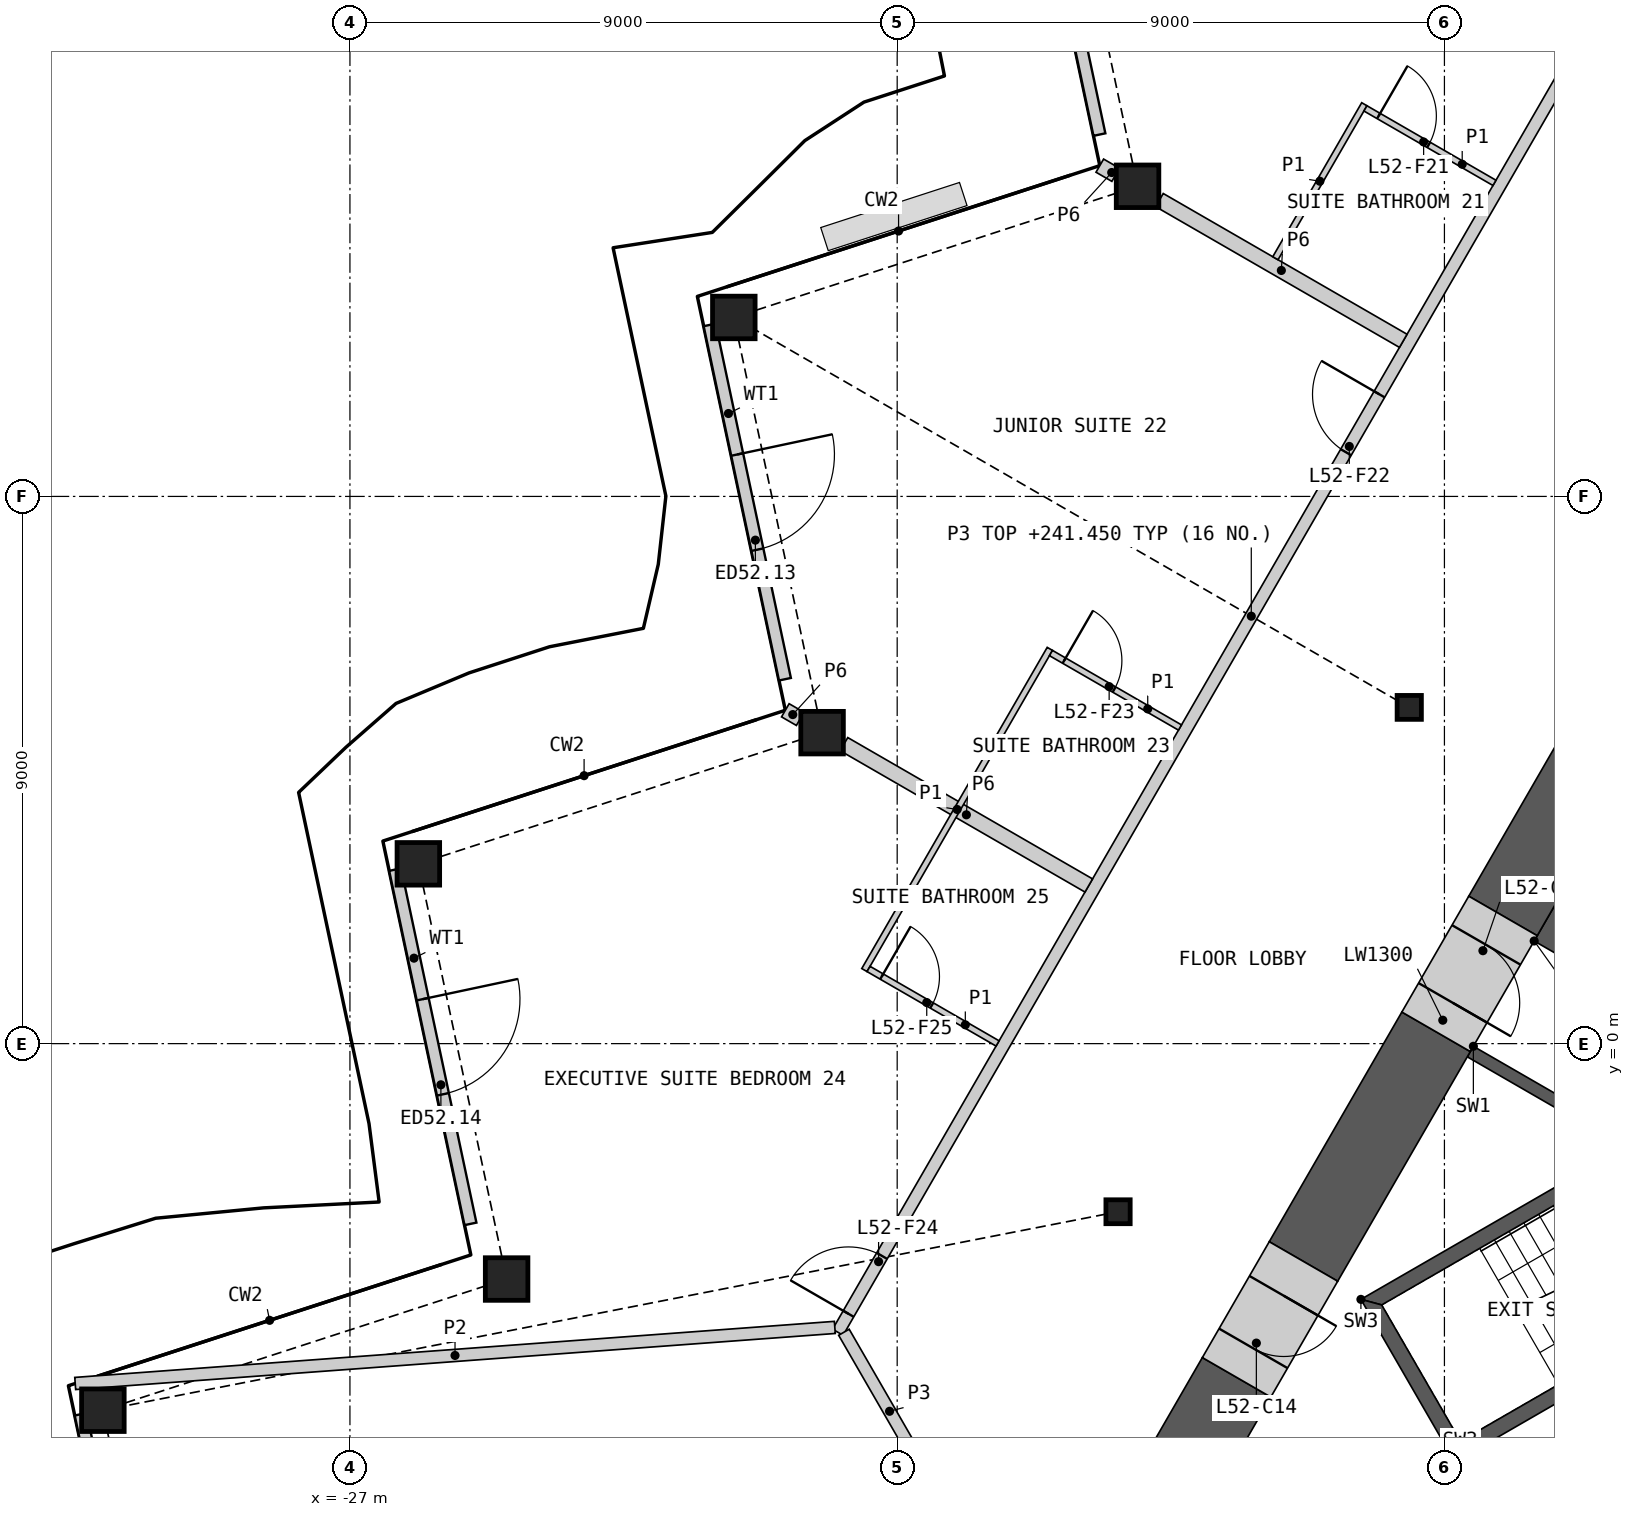
"""IFC4 building model, lengths in metres.
Left out: names, types, materials, properties, quantities, classifications, styles, units other than length and angle.
Written with IfcOpenShell. Run it as: python <this file> out.ifc"""

import sys

from ifc_helpers import new_model, si_unit, direction, frame, frame_2d, origin, origin_2d, place, context, subcontext, project, spatial, polyline, rectangle, hollow_rectangle, i_section, outline, extrude, element, fill, save


model = new_model("IFC4")
c1 = context("Model", 3, precision=1e-05, world=origin(), true_north=direction((0.0, 1.0)))
c2 = subcontext(c1, "Body", "Model", "MODEL_VIEW")
j1 = project(units=[si_unit("LENGTHUNIT", "METRE"), si_unit("PLANEANGLEUNIT", "RADIAN")], contexts=[c1])
p1 = place(None, origin())
s1 = spatial("IfcSite", under=j1, at=p1, CompositionType="ELEMENT")
p2 = place(p1, origin())
s2 = spatial("IfcBuilding", under=s1, at=p2, CompositionType="ELEMENT")
p3 = place(p2, frame((0.0, 0.0, 238.2)))
s3 = spatial("IfcBuildingStorey", under=s2, at=p3, CompositionType="ELEMENT", Elevation=238.2)
for number, where, z_axis, x_axis in (
    (1, (-14.047, 14.101, 0.0), (0.0, 0.0, 1.0), (1.0, 0.0, 0.0)),
    (2, (-20.687, 11.943, 0.0), (0.0, 0.0, 1.0), (1.0, 0.0, 0.0)),
    (3, (-19.235, 5.115, 0.0), (0.0, 0.0, 1.0), (1.0, 0.0, 0.0)),
    (4, (-25.875, 2.957, 0.0), (0.0, 0.0, 1.0), (1.0, 0.0, 0.0)),
    (5, (-24.423, -3.872, 0.0), (0.0, 0.0, 1.0), (1.0, 0.0, 0.0)),
    (6, (-31.063, -6.029, 0.0), (0.0, 0.0, 1.0), (1.0, 0.0, 0.0)),
):
    element("IfcColumn", number, at=place(p3, frame(where, z_axis=z_axis, x_axis=x_axis)), inside=s3, PredefinedType="COLUMN", context=c2, shape_type="SweptSolid", body=[
        extrude(hollow_rectangle(XDim=0.7, YDim=0.7, WallThickness=0.045, at=origin_2d()), origin(), (0.0, 0.0, 1.0), 3.6),
    ])
for number, where, z_axis, x_axis in (
    (7, (-9.578, 5.53, 0.0), (0.0, 0.0, 1.0), (1.0, 0.0, 0.0)),
    (8, (-14.368, -2.765, 0.0), (0.0, 0.0, 1.0), (1.0, 0.0, 0.0)),
):
    element("IfcColumn", number, at=place(p3, frame(where, z_axis=z_axis, x_axis=x_axis)), inside=s3, PredefinedType="COLUMN", context=c2, shape_type="SweptSolid", body=[
        extrude(i_section(OverallWidth=0.399, OverallDepth=0.393, WebThickness=0.023, FlangeThickness=0.037, at=origin_2d()), origin(), (0.0, 0.0, 1.0), 3.6),
    ])
p4 = place(p3, frame((-15.913, 20.779, 0.0), z_axis=(0.0, 0.0, 1.0), x_axis=(0.207930802022, -0.978143538327, 0.0)))
e9 = element("IfcWall", 9, at=p4, inside=s3, PredefinedType="SOLIDWALL", context=c2, shape_type="SweptSolid", body=[
    extrude(rectangle(XDim=5.958, YDim=0.2, at=frame_2d((2.979, 0.0))), origin(), (0.0, 0.0, 1.0), 2.701),
])
p5 = place(p4, frame((2.179, 0.0, 0.0)))
e10 = element("IfcOpeningElement", 10, at=p5, cuts=e9, PredefinedType="OPENING", context=c2, shape_type="SweptSolid", body=[
    extrude(rectangle(XDim=1.6, YDim=2.4, at=frame_2d((0.8, 1.2))), frame((0.0, 0.11, 0.0), z_axis=(0.0, -1.0, 0.0), x_axis=(1.0, 0.0, 0.0)), (0.0, 0.0, 1.0), 0.22),
])
p6 = place(p3, frame((-21.085, 11.821, 0.0), z_axis=(0.0, 0.0, 1.0), x_axis=(0.207930802022, -0.978143538327, 0.0)))
e11 = element("IfcWall", 11, at=p6, inside=s3, PredefinedType="SOLIDWALL", context=c2, shape_type="SweptSolid", body=[
    extrude(rectangle(XDim=5.958, YDim=0.2, at=frame_2d((2.979, 0.0))), origin(), (0.0, 0.0, 1.0), 2.701),
])
p7 = place(p6, frame((2.179, 0.0, 0.0)))
e12 = element("IfcOpeningElement", 12, at=p7, cuts=e11, PredefinedType="OPENING", context=c2, shape_type="SweptSolid", body=[
    extrude(rectangle(XDim=1.6, YDim=2.4, at=frame_2d((0.8, 1.2))), frame((0.0, 0.11, 0.0), z_axis=(0.0, -1.0, 0.0), x_axis=(1.0, 0.0, 0.0)), (0.0, 0.0, 1.0), 0.22),
])
p8 = place(p3, frame((-26.257, 2.863, 0.0), z_axis=(0.0, 0.0, 1.0), x_axis=(0.207930802022, -0.978143538327, 0.0)))
e13 = element("IfcWall", 13, at=p8, inside=s3, PredefinedType="SOLIDWALL", context=c2, shape_type="SweptSolid", body=[
    extrude(rectangle(XDim=5.958, YDim=0.2, at=frame_2d((2.979, 0.0))), origin(), (0.0, 0.0, 1.0), 2.701),
])
p9 = place(p8, frame((2.179, 0.0, 0.0)))
e14 = element("IfcOpeningElement", 14, at=p9, cuts=e13, PredefinedType="OPENING", context=c2, shape_type="SweptSolid", body=[
    extrude(rectangle(XDim=1.6, YDim=2.4, at=frame_2d((0.8, 1.2))), frame((0.0, 0.11, 0.0), z_axis=(0.0, -1.0, 0.0), x_axis=(1.0, 0.0, 0.0)), (0.0, 0.0, 1.0), 0.22),
])
p10 = place(p3, frame((-31.428, -6.095, 0.0), z_axis=(0.0, 0.0, 1.0), x_axis=(0.207939137045, -0.978141766456, 0.0)))
e15 = element("IfcWall", 15, at=p10, inside=s3, PredefinedType="SOLIDWALL", context=c2, shape_type="SweptSolid", body=[
    extrude(rectangle(XDim=5.957, YDim=0.2, at=frame_2d((2.979, 0.0))), origin(), (0.0, 0.0, 1.0), 2.701),
])
p11 = place(p10, frame((2.179, 0.0, 0.0)))
e16 = element("IfcOpeningElement", 16, at=p11, cuts=e15, PredefinedType="OPENING", context=c2, shape_type="SweptSolid", body=[
    extrude(rectangle(XDim=1.6, YDim=2.4, at=frame_2d((0.8, 1.2))), frame((0.0, 0.11, 0.0), z_axis=(0.0, -1.0, 0.0), x_axis=(1.0, 0.0, 0.0)), (0.0, 0.0, 1.0), 0.22),
])
p12 = place(p3, origin())
e17 = element("IfcWall", 17, at=p12, inside=s3, PredefinedType="SHEAR", context=c2, shape_type="SweptSolid", body=[
    extrude(outline(polyline([(-7.524, 1.688), (-4.124, 7.577), (-3.731, 7.35), (-1.561, 6.097), (-1.66, 5.924), (-3.652, 7.074), (-4.652, 5.342), (-2.66, 4.192), (-2.76, 4.019), (-4.752, 5.169), (-5.752, 3.437), (-3.76, 2.287), (-3.861, 2.113), (-5.852, 3.263), (-6.852, 1.531), (-4.861, 0.381), (-4.96, 0.208), (-7.131, 1.461), (-7.524, 1.688)])), origin(), (0.0, 0.0, 1.0), 3.25),
])
p13 = place(p3, origin())
e18 = element("IfcWall", 18, at=p13, inside=s3, PredefinedType="SHEAR", context=c2, shape_type="SweptSolid", body=[
    extrude(outline(polyline([(-8.524, -0.044), (-8.131, -0.271), (-5.96, -1.524), (-6.061, -1.697), (-8.231, -0.444), (-8.624, -0.217), (-8.524, -0.044)])), origin(), (0.0, 0.0, 1.0), 3.25),
])
p14 = place(p3, origin())
e19 = element("IfcWall", 19, at=p14, inside=s3, PredefinedType="SHEAR", context=c2, shape_type="SweptSolid", body=[
    extrude(outline(polyline([(-5.307, -1.281), (-10.374, -4.206), (-10.032, -4.298), (-5.182, -1.498), (-5.307, -1.281)])), origin(), (0.0, 0.0, 1.0), 3.25),
])
p15 = place(p3, origin())
e20 = element("IfcWall", 20, at=p15, inside=s3, PredefinedType="SHEAR", context=c2, shape_type="SweptSolid", body=[
    extrude(outline(polyline([(-10.374, -4.206), (-8.83, -6.881), (-8.738, -6.539), (-10.032, -4.298), (-10.374, -4.206)])), origin(), (0.0, 0.0, 1.0), 3.25),
])
p16 = place(p3, origin())
e21 = element("IfcWall", 21, at=p16, inside=s3, PredefinedType="SHEAR", context=c2, shape_type="SweptSolid", body=[
    extrude(outline(polyline([(-8.738, -6.539), (-8.83, -6.881), (-3.763, -3.956), (-3.888, -3.739), (-8.738, -6.539)])), origin(), (0.0, 0.0, 1.0), 3.25),
])
p17 = place(p3, frame((-4.636, 7.99, 0.0), z_axis=(0.0, 0.0, 1.0), x_axis=(-0.500022813292, -0.866012232124, 0.0)))
e22 = element("IfcWall", 22, at=p17, inside=s3, PredefinedType="SHEAR", context=c2, shape_type="SweptSolid", body=[
    extrude(rectangle(XDim=6.802, YDim=1.3, at=frame_2d((3.401, 0.0))), origin(), (0.0, 0.0, 1.0), 3.25),
])
p18 = place(p3, frame((-9.137, 0.195, 0.0), z_axis=(0.0, 0.0, 1.0), x_axis=(-0.499985697398, -0.866033661238, 0.0)))
e23 = element("IfcWall", 23, at=p18, inside=s3, PredefinedType="SHEAR", context=c2, shape_type="SweptSolid", body=[
    extrude(rectangle(XDim=4.362, YDim=1.3, at=frame_2d((2.181, 0.0))), origin(), (0.0, 0.0, 1.0), 3.25),
])
p19 = place(p3, frame((-12.418, -5.488, 0.0), z_axis=(0.0, 0.0, 1.0), x_axis=(-0.499931460552, -0.866064971437, 0.0)))
e24 = element("IfcWall", 24, at=p19, inside=s3, PredefinedType="SHEAR", context=c2, shape_type="SweptSolid", body=[
    extrude(rectangle(XDim=1.786, YDim=1.3, at=frame_2d((0.893, 0.0))), origin(), (0.0, 0.0, 1.0), 3.25),
])
p20 = place(p3, frame((-11.318, -3.583, 0.0), z_axis=(0.0, 0.0, 1.0), x_axis=(-0.50002983664, -0.866008176907, 0.0)))
e25 = element("IfcWall", 25, at=p20, inside=s3, PredefinedType="SHEAR", context=c2, shape_type="SweptSolid", body=[
    extrude(rectangle(XDim=2.2, YDim=1.3, at=frame_2d((1.1, 0.0))), origin(), (0.0, 0.0, 1.0), 3.25),
])
p21 = place(p20, frame((0.65, 0.0, 0.0)))
e26 = element("IfcOpeningElement", 26, at=p21, cuts=e25, PredefinedType="OPENING", context=c2, shape_type="SweptSolid", body=[
    extrude(rectangle(XDim=1.0, YDim=2.1, at=frame_2d((0.5, 1.05))), frame((0.0, 0.66, 0.0), z_axis=(0.0, -1.0, 0.0), x_axis=(1.0, 0.0, 0.0)), (0.0, 0.0, 1.0), 1.32),
])
p22 = place(p3, frame((-8.037, 2.1, 0.0), z_axis=(0.0, 0.0, 1.0), x_axis=(-0.50002983664, -0.866008176907, 0.0)))
e27 = element("IfcWall", 27, at=p22, inside=s3, PredefinedType="SHEAR", context=c2, shape_type="SweptSolid", body=[
    extrude(rectangle(XDim=2.2, YDim=1.3, at=frame_2d((1.1, 0.0))), origin(), (0.0, 0.0, 1.0), 3.25),
])
p23 = place(p22, frame((0.55, 0.0, 0.0)))
e28 = element("IfcOpeningElement", 28, at=p23, cuts=e27, PredefinedType="OPENING", context=c2, shape_type="SweptSolid", body=[
    extrude(rectangle(XDim=1.1, YDim=2.1, at=frame_2d((0.55, 1.05))), frame((0.0, 0.66, 0.0), z_axis=(0.0, -1.0, 0.0), x_axis=(1.0, 0.0, 0.0)), (0.0, 0.0, 1.0), 1.32),
])
p24 = place(p3, frame((-18.976, -4.747, 0.0), z_axis=(0.0, 0.0, 1.0), x_axis=(0.499999852422, 0.866025488988, 0.0)))
e29 = element("IfcWall", 29, at=p24, inside=s3, PredefinedType="PARTITIONING", context=c2, shape_type="SweptSolid", body=[
    extrude(rectangle(XDim=27.198, YDim=0.2, at=frame_2d((13.599, 0.0))), origin(), (0.0, 0.0, 1.0), 3.25),
])
p25 = place(p24, frame((25.346, 0.0, 0.0)))
e30 = element("IfcOpeningElement", 30, at=p25, cuts=e29, PredefinedType="OPENING", context=c2, shape_type="SweptSolid", body=[
    extrude(rectangle(XDim=1.1, YDim=2.1, at=frame_2d((0.55, 1.05))), frame((0.0, 0.11, 0.0), z_axis=(0.0, -1.0, 0.0), x_axis=(1.0, 0.0, 0.0)), (0.0, 0.0, 1.0), 0.22),
])
p26 = place(p24, frame((16.713, 0.0, 0.0)))
e31 = element("IfcOpeningElement", 31, at=p26, cuts=e29, PredefinedType="OPENING", context=c2, shape_type="SweptSolid", body=[
    extrude(rectangle(XDim=1.1, YDim=2.1, at=frame_2d((0.55, 1.05))), frame((0.0, 0.11, 0.0), z_axis=(0.0, -1.0, 0.0), x_axis=(1.0, 0.0, 0.0)), (0.0, 0.0, 1.0), 0.22),
])
p27 = place(p24, frame((0.35, 0.0, 0.0)))
e32 = element("IfcOpeningElement", 32, at=p27, cuts=e29, PredefinedType="OPENING", context=c2, shape_type="SweptSolid", body=[
    extrude(rectangle(XDim=1.1, YDim=2.1, at=frame_2d((0.55, 1.05))), frame((0.0, 0.11, 0.0), z_axis=(0.0, -1.0, 0.0), x_axis=(1.0, 0.0, 0.0)), (0.0, 0.0, 1.0), 0.22),
])
p28 = place(p3, frame((-18.875, 4.926, 0.0), z_axis=(0.0, 0.0, 1.0), x_axis=(0.866014168242, -0.500019460026, 0.0)))
e33 = element("IfcWall", 33, at=p28, inside=s3, PredefinedType="PARTITIONING", context=c2, shape_type="SweptSolid", body=[
    extrude(rectangle(XDim=4.649, YDim=0.25, at=frame_2d((2.324, 0.0))), origin(), (0.0, 0.0, 1.0), 2.404),
])
p29 = place(p3, frame((-13.687, 13.874, 0.0), z_axis=(0.0, 0.0, 1.0), x_axis=(0.866034555462, -0.499984148495, 0.0)))
e34 = element("IfcWall", 34, at=p29, inside=s3, PredefinedType="PARTITIONING", context=c2, shape_type="SweptSolid", body=[
    extrude(rectangle(XDim=4.63, YDim=0.25, at=frame_2d((2.315, 0.0))), origin(), (0.0, 0.0, 1.0), 2.404),
])
p30 = place(p3, frame((-18.876, -4.747, 0.0), z_axis=(0.0, 0.0, 1.0), x_axis=(0.499952404951, -0.866052881055, 0.0)))
e35 = element("IfcWall", 35, at=p30, inside=s3, PredefinedType="PARTITIONING", context=c2, shape_type="SweptSolid", body=[
    extrude(rectangle(XDim=3.002, YDim=0.2, at=frame_2d((1.501, 0.0))), origin(), (0.0, 0.0, 1.0), 3.25),
])
p31 = place(p3, frame((-14.668, 14.44, 0.0), z_axis=(0.0, 0.0, 1.0), x_axis=(0.865888485494, -0.500237074485, 0.0)))
e36 = element("IfcWall", 36, at=p31, inside=s3, PredefinedType="PARTITIONING", context=c2, shape_type="SweptSolid", body=[
    extrude(rectangle(XDim=0.301, YDim=0.25, at=frame_2d((0.15, 0.0))), origin(), (0.0, 0.0, 1.0), 2.404),
])
p32 = place(p3, frame((-19.84, 5.482, 0.0), z_axis=(0.0, 0.0, 1.0), x_axis=(0.865998287773, -0.500046963369, 0.0)))
e37 = element("IfcWall", 37, at=p32, inside=s3, PredefinedType="PARTITIONING", context=c2, shape_type="SweptSolid", body=[
    extrude(rectangle(XDim=0.282, YDim=0.25, at=frame_2d((0.141, 0.0))), origin(), (0.0, 0.0, 1.0), 2.404),
])
p33 = place(p3, frame((-31.518, -5.59, 0.0), z_axis=(0.0, 0.0, 1.0), x_axis=(0.99728681237, 0.073613951618, 0.0)))
e38 = element("IfcWall", 38, at=p33, inside=s3, PredefinedType="PARTITIONING", context=c2, shape_type="SweptSolid", body=[
    extrude(rectangle(XDim=12.526, YDim=0.2, at=frame_2d((6.263, 0.0))), origin(), (0.0, 0.0, 1.0), 2.404),
])
p34 = place(p3, frame((-18.539, 1.21, 0.0), z_axis=(0.0, 0.0, 1.0), x_axis=(0.500008851346, 0.866020293397, 0.0)))
e39 = element("IfcWall", 39, at=p34, inside=s3, PredefinedType="PARTITIONING", context=c2, shape_type="SweptSolid", body=[
    extrude(rectangle(XDim=6.1, YDim=0.1, at=frame_2d((3.05, 0.0))), origin(), (0.0, 0.0, 1.0), 2.404),
])
p35 = place(p3, frame((-11.78, 12.917, 0.0), z_axis=(0.0, 0.0, 1.0), x_axis=(0.499999433879, 0.866025730634, 0.0)))
e40 = element("IfcWall", 40, at=p35, inside=s3, PredefinedType="PARTITIONING", context=c2, shape_type="SweptSolid", body=[
    extrude(rectangle(XDim=2.925, YDim=0.1, at=frame_2d((1.462, 0.0))), origin(), (0.0, 0.0, 1.0), 2.404),
])
p36 = place(p3, frame((-15.471, 6.424, 0.0), z_axis=(0.0, 0.0, 1.0), x_axis=(0.866014668023, -0.500018594424, 0.0)))
e41 = element("IfcWall", 41, at=p36, inside=s3, PredefinedType="PARTITIONING", context=c2, shape_type="SweptSolid", body=[
    extrude(rectangle(XDim=2.45, YDim=0.1, at=frame_2d((1.225, 0.0))), origin(), (0.0, 0.0, 1.0), 2.404),
])
p37 = place(p36, frame((0.25, 0.0, 0.0)))
e42 = element("IfcOpeningElement", 42, at=p37, cuts=e41, PredefinedType="OPENING", context=c2, shape_type="SweptSolid", body=[
    extrude(rectangle(XDim=0.95, YDim=2.1, at=frame_2d((0.475, 1.05))), frame((0.0, 0.06, 0.0), z_axis=(0.0, -1.0, 0.0), x_axis=(1.0, 0.0, 0.0)), (0.0, 0.0, 1.0), 0.12),
])
p38 = place(p3, frame((-18.471, 1.228, 0.0), z_axis=(0.0, 0.0, 1.0), x_axis=(0.866057815567, -0.499943856944, 0.0)))
e43 = element("IfcWall", 43, at=p38, inside=s3, PredefinedType="PARTITIONING", context=c2, shape_type="SweptSolid", body=[
    extrude(rectangle(XDim=2.45, YDim=0.1, at=frame_2d((1.225, 0.0))), origin(), (0.0, 0.0, 1.0), 2.404),
])
p39 = place(p38, frame((0.25, 0.0, 0.0)))
e44 = element("IfcOpeningElement", 44, at=p39, cuts=e43, PredefinedType="OPENING", context=c2, shape_type="SweptSolid", body=[
    extrude(rectangle(XDim=0.95, YDim=2.1, at=frame_2d((0.475, 1.05))), frame((0.0, 0.06, 0.0), z_axis=(0.0, -1.0, 0.0), x_axis=(1.0, 0.0, 0.0)), (0.0, 0.0, 1.0), 0.12),
])
p40 = place(p3, frame((-10.299, 15.382, 0.0), z_axis=(0.0, 0.0, 1.0), x_axis=(0.866057815567, -0.499943856944, 0.0)))
e45 = element("IfcWall", 45, at=p40, inside=s3, PredefinedType="PARTITIONING", context=c2, shape_type="SweptSolid", body=[
    extrude(rectangle(XDim=2.45, YDim=0.1, at=frame_2d((1.225, 0.0))), origin(), (0.0, 0.0, 1.0), 2.404),
])
p41 = place(p40, frame((0.25, 0.0, 0.0)))
e46 = element("IfcOpeningElement", 46, at=p41, cuts=e45, PredefinedType="OPENING", context=c2, shape_type="SweptSolid", body=[
    extrude(rectangle(XDim=0.95, YDim=2.1, at=frame_2d((0.475, 1.05))), frame((0.0, 0.06, 0.0), z_axis=(0.0, -1.0, 0.0), x_axis=(1.0, 0.0, 0.0)), (0.0, 0.0, 1.0), 0.12),
])
p42 = place(p7, origin())
e47 = element("IfcDoor", 47, at=p42, inside=s3, OperationType="DOUBLE_DOOR_SINGLE_SWING", PredefinedType="DOOR", context=c2, shape_type="SweptSolid", body=[
    extrude(rectangle(XDim=1.6, YDim=2.4, at=frame_2d((0.8, 1.2))), frame((0.0, 0.025, 0.0), z_axis=(0.0, -1.0, 0.0), x_axis=(1.0, 0.0, 0.0)), (0.0, 0.0, 1.0), 0.05),
])
fill(e12, e47)
p43 = place(p9, origin())
e48 = element("IfcDoor", 48, at=p43, inside=s3, OperationType="DOUBLE_DOOR_SINGLE_SWING", PredefinedType="DOOR", context=c2, shape_type="SweptSolid", body=[
    extrude(rectangle(XDim=1.6, YDim=2.4, at=frame_2d((0.8, 1.2))), frame((0.0, 0.025, 0.0), z_axis=(0.0, -1.0, 0.0), x_axis=(1.0, 0.0, 0.0)), (0.0, 0.0, 1.0), 0.05),
])
fill(e14, e48)
p44 = place(p21, origin())
e49 = element("IfcDoor", 49, at=p44, inside=s3, OperationType="SINGLE_SWING_LEFT", PredefinedType="DOOR", context=c2, shape_type="SweptSolid", body=[
    extrude(rectangle(XDim=1.0, YDim=2.1, at=frame_2d((0.5, 1.05))), frame((0.0, 0.405, 0.0), z_axis=(0.0, -1.0, 0.0), x_axis=(1.0, 0.0, 0.0)), (0.0, 0.0, 1.0), 0.05),
])
fill(e26, e49)
p45 = place(p23, origin())
e50 = element("IfcDoor", 50, at=p45, inside=s3, OperationType="SINGLE_SWING_RIGHT", PredefinedType="DOOR", context=c2, shape_type="SweptSolid", body=[
    extrude(rectangle(XDim=1.1, YDim=2.1, at=frame_2d((0.55, 1.05))), frame((0.0, 0.405, 0.0), z_axis=(0.0, -1.0, 0.0), x_axis=(1.0, 0.0, 0.0)), (0.0, 0.0, 1.0), 0.05),
])
fill(e28, e50)
p46 = place(p41, origin())
e51 = element("IfcDoor", 51, at=p46, inside=s3, OperationType="SINGLE_SWING_LEFT", PredefinedType="DOOR", context=c2, shape_type="SweptSolid", body=[
    extrude(rectangle(XDim=0.95, YDim=2.1, at=frame_2d((0.475, 1.05))), frame((0.0, 0.025, 0.0), z_axis=(0.0, -1.0, 0.0), x_axis=(1.0, 0.0, 0.0)), (0.0, 0.0, 1.0), 0.05),
])
fill(e46, e51)
p47 = place(p26, origin())
e52 = element("IfcDoor", 52, at=p47, inside=s3, OperationType="SINGLE_SWING_RIGHT", PredefinedType="DOOR", context=c2, shape_type="SweptSolid", body=[
    extrude(rectangle(XDim=1.1, YDim=2.1, at=frame_2d((0.55, 1.05))), frame((0.0, 0.025, 0.0), z_axis=(0.0, -1.0, 0.0), x_axis=(1.0, 0.0, 0.0)), (0.0, 0.0, 1.0), 0.05),
])
fill(e31, e52)
p48 = place(p37, origin())
e53 = element("IfcDoor", 53, at=p48, inside=s3, OperationType="SINGLE_SWING_LEFT", PredefinedType="DOOR", context=c2, shape_type="SweptSolid", body=[
    extrude(rectangle(XDim=0.95, YDim=2.1, at=frame_2d((0.475, 1.05))), frame((0.0, 0.025, 0.0), z_axis=(0.0, -1.0, 0.0), x_axis=(1.0, 0.0, 0.0)), (0.0, 0.0, 1.0), 0.05),
])
fill(e42, e53)
p49 = place(p27, origin())
e54 = element("IfcDoor", 54, at=p49, inside=s3, OperationType="SINGLE_SWING_LEFT", PredefinedType="DOOR", context=c2, shape_type="SweptSolid", body=[
    extrude(rectangle(XDim=1.1, YDim=2.1, at=frame_2d((0.55, 1.05))), frame((0.0, 0.025, 0.0), z_axis=(0.0, -1.0, 0.0), x_axis=(1.0, 0.0, 0.0)), (0.0, 0.0, 1.0), 0.05),
])
fill(e32, e54)
p50 = place(p39, origin())
e55 = element("IfcDoor", 55, at=p50, inside=s3, OperationType="SINGLE_SWING_LEFT", PredefinedType="DOOR", context=c2, shape_type="SweptSolid", body=[
    extrude(rectangle(XDim=0.95, YDim=2.1, at=frame_2d((0.475, 1.05))), frame((0.0, 0.025, 0.0), z_axis=(0.0, -1.0, 0.0), x_axis=(1.0, 0.0, 0.0)), (0.0, 0.0, 1.0), 0.05),
])
fill(e44, e55)
save(model, sys.argv[1])
